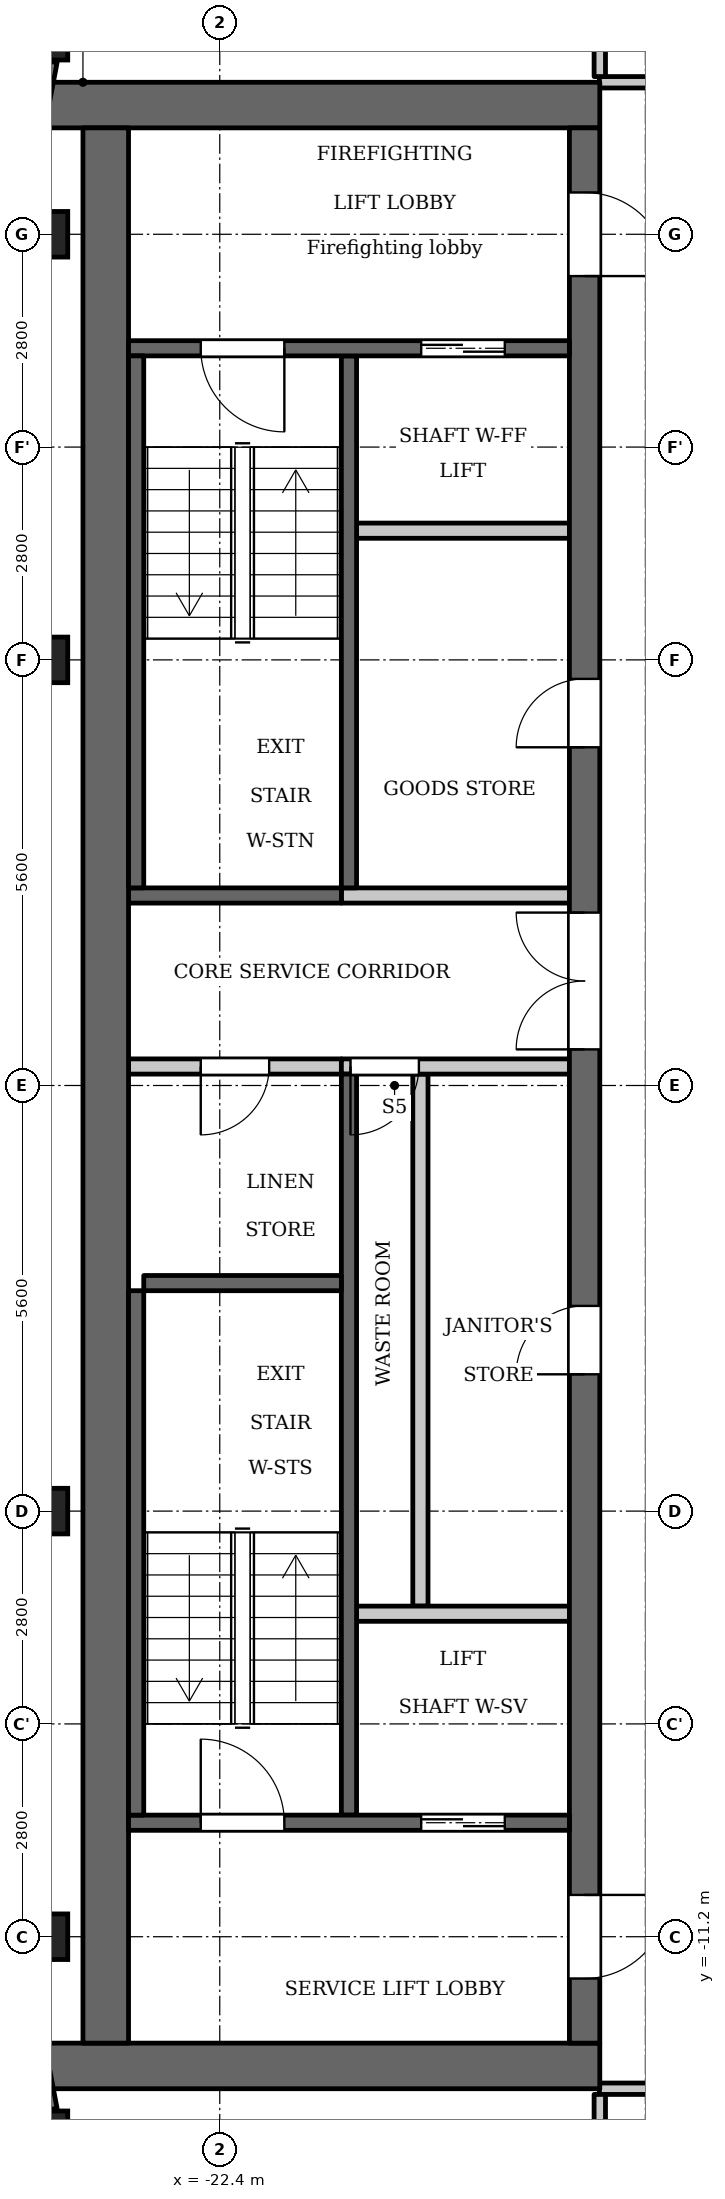
"""IFC4 building model, lengths in metres.
Left out: names, types, materials, properties, quantities, classifications, styles, units other than length and angle.
Written with IfcOpenShell. Run it as: python <this file> out.ifc"""

import sys

from ifc_helpers import new_model, si_unit, direction, frame, frame_2d, origin, origin_2d, place, context, subcontext, project, spatial, rectangle, extrude, element, fill, save


model = new_model("IFC4")
c1 = context("Model", 3, precision=1e-05, world=origin(), true_north=direction((0.0, 1.0)))
c2 = subcontext(c1, "Body", "Model", "MODEL_VIEW")
j1 = project(units=[si_unit("LENGTHUNIT", "METRE"), si_unit("PLANEANGLEUNIT", "RADIAN")], contexts=[c1])
p1 = place(None, origin())
s1 = spatial("IfcSite", under=j1, at=p1, CompositionType="ELEMENT")
p2 = place(p1, origin())
s2 = spatial("IfcBuilding", under=s1, at=p2, CompositionType="ELEMENT")
p3 = place(p2, frame((0.0, 0.0, 303.4)))
s3 = spatial("IfcBuildingStorey", under=s2, at=p3, CompositionType="ELEMENT", Elevation=303.4)
for number, where, z_axis, x_axis in (
    (1, (-24.7, -13.793, 0.0), (0.0, 0.0, 1.0), (1.0, 0.0, 0.0)),
    (2, (-24.7, -11.2, 0.0), (0.0, 0.0, 1.0), (1.0, 0.0, 0.0)),
    (3, (-24.7, -5.6, 0.0), (0.0, 0.0, 1.0), (1.0, 0.0, 0.0)),
    (4, (-24.7, 5.6, 0.0), (0.0, 0.0, 1.0), (1.0, 0.0, 0.0)),
    (5, (-24.7, 11.2, 0.0), (0.0, 0.0, 1.0), (1.0, 0.0, 0.0)),
    (6, (-24.7, 13.793, 0.0), (0.0, 0.0, 1.0), (1.0, 0.0, 0.0)),
):
    element("IfcColumn", number, at=place(p3, frame(where, z_axis=z_axis, x_axis=x_axis)), inside=s3, PredefinedType="COLUMN", context=c2, shape_type="SweptSolid", body=[
        extrude(rectangle(XDim=0.6, YDim=0.6, at=origin_2d()), origin(), (0.0, 0.0, 1.0), 3.5),
    ])
for number, where, z_axis, x_axis in (
    (7, (-24.688, 13.485, 0.0), (0.0, 0.0, 1.0), (-0.187, -0.982, 0.0)),
    (8, (-25.052, -11.573, 0.0), (0.0, 0.0, 1.0), (0.187, -0.982, 0.0)),
):
    element("IfcWall", number, at=place(p3, frame(where, z_axis=z_axis, x_axis=x_axis)), inside=s3, PredefinedType="SOLIDWALL", context=c2, shape_type="SweptSolid", body=[
        extrude(rectangle(XDim=1.947, YDim=0.3, at=frame_2d((0.973, 0.0))), origin(), (0.0, 0.0, 1.0), 2.6),
    ])
p4 = place(p3, frame((-20.7, 2.6, 0.0), z_axis=(0.0, 0.0, 1.0), x_axis=(0.0, 1.0, 0.0)))
e9 = element("IfcWall", 9, at=p4, inside=s3, PredefinedType="SHEAR", context=c2, shape_type="SweptSolid", body=[
    extrude(rectangle(XDim=7.0, YDim=0.2, at=frame_2d((3.5, 0.0))), origin(), (0.0, 0.0, 1.0), 3.2),
])
p5 = place(p3, frame((-20.7, -9.6, 0.0), z_axis=(0.0, 0.0, 1.0), x_axis=(0.0, 1.0, 0.0)))
e10 = element("IfcWall", 10, at=p5, inside=s3, PredefinedType="SHEAR", context=c2, shape_type="SweptSolid", body=[
    extrude(rectangle(XDim=9.75, YDim=0.2, at=frame_2d((4.875, 0.0))), origin(), (0.0, 0.0, 1.0), 3.2),
])
p6 = place(p3, frame((-20.8, 2.5, 0.0), z_axis=(0.0, 0.0, 1.0), x_axis=(-1.0, 0.0, 0.0)))
e11 = element("IfcWall", 11, at=p6, inside=s3, PredefinedType="SHEAR", context=c2, shape_type="SweptSolid", body=[
    extrude(rectangle(XDim=2.8, YDim=0.2, at=frame_2d((1.4, 0.0))), origin(), (0.0, 0.0, 1.0), 3.2),
])
p7 = place(p3, frame((-20.8, 0.25, 0.0), z_axis=(0.0, 0.0, 1.0), x_axis=(-1.0, 0.0, 0.0)))
e12 = element("IfcWall", 12, at=p7, inside=s3, PredefinedType="PARTITIONING", context=c2, shape_type="SweptSolid", body=[
    extrude(rectangle(XDim=2.8, YDim=0.2, at=frame_2d((1.4, 0.0))), origin(), (0.0, 0.0, 1.0), 3.2),
])
p8 = place(p7, frame((0.95, 0.0, 0.0)))
e13 = element("IfcOpeningElement", 13, at=p8, cuts=e12, PredefinedType="OPENING", context=c2, shape_type="SweptSolid", body=[
    extrude(rectangle(XDim=0.9, YDim=2.1, at=frame_2d((0.45, 1.05))), frame((0.0, 0.11, 0.0), z_axis=(0.0, -1.0, 0.0), x_axis=(1.0, 0.0, 0.0)), (0.0, 0.0, 1.0), 0.22),
])
for number, where, z_axis, x_axis in (
    (14, (-17.4, 12.9, 0.0), (0.0, 0.0, 1.0), (-1.0, 0.0, 0.0)),
    (15, (-17.4, -12.9, 0.0), (0.0, 0.0, 1.0), (-1.0, 0.0, 0.0)),
):
    element("IfcWall", number, at=place(p3, frame(where, z_axis=z_axis, x_axis=x_axis)), inside=s3, PredefinedType="SHEAR", context=c2, shape_type="SweptSolid", body=[
        extrude(rectangle(XDim=7.6, YDim=0.6, at=frame_2d((3.8, 0.0))), origin(), (0.0, 0.0, 1.0), 3.2),
    ])
p9 = place(p3, frame((-19.76, -6.85, 0.0), z_axis=(0.0, 0.0, 1.0), x_axis=(0.0, 1.0, 0.0)))
e16 = element("IfcWall", 16, at=p9, inside=s3, PredefinedType="PARTITIONING", context=c2, shape_type="SweptSolid", body=[
    extrude(rectangle(XDim=7.0, YDim=0.2, at=frame_2d((3.5, 0.0))), origin(), (0.0, 0.0, 1.0), 3.2),
])
p10 = place(p3, frame((-17.6, -12.6, 0.0), z_axis=(0.0, 0.0, 1.0), x_axis=(0.0, 1.0, 0.0)))
e17 = element("IfcWall", 17, at=p10, inside=s3, PredefinedType="SHEAR", context=c2, shape_type="SweptSolid", body=[
    extrude(rectangle(XDim=25.2, YDim=0.4, at=frame_2d((12.6, 0.0))), origin(), (0.0, 0.0, 1.0), 3.2),
])
p11 = place(p10, frame((8.8, 0.0, 0.0)))
e18 = element("IfcOpeningElement", 18, at=p11, cuts=e17, PredefinedType="OPENING", context=c2, shape_type="SweptSolid", body=[
    extrude(rectangle(XDim=0.9, YDim=2.1, at=frame_2d((0.45, 1.05))), frame((0.0, 0.21, 0.0), z_axis=(0.0, -1.0, 0.0), x_axis=(1.0, 0.0, 0.0)), (0.0, 0.0, 1.0), 0.42),
])
p12 = place(p10, frame((17.05, 0.0, 0.0)))
e19 = element("IfcOpeningElement", 19, at=p12, cuts=e17, PredefinedType="OPENING", context=c2, shape_type="SweptSolid", body=[
    extrude(rectangle(XDim=0.9, YDim=2.1, at=frame_2d((0.45, 1.05))), frame((0.0, 0.21, 0.0), z_axis=(0.0, -1.0, 0.0), x_axis=(1.0, 0.0, 0.0)), (0.0, 0.0, 1.0), 0.42),
])
p13 = place(p10, frame((23.25, 0.0, 0.0)))
e20 = element("IfcOpeningElement", 20, at=p13, cuts=e17, PredefinedType="OPENING", context=c2, shape_type="SweptSolid", body=[
    extrude(rectangle(XDim=1.1, YDim=2.1, at=frame_2d((0.55, 1.05))), frame((0.0, 0.21, 0.0), z_axis=(0.0, -1.0, 0.0), x_axis=(1.0, 0.0, 0.0)), (0.0, 0.0, 1.0), 0.42),
])
p14 = place(p10, frame((0.85, 0.0, 0.0)))
e21 = element("IfcOpeningElement", 21, at=p14, cuts=e17, PredefinedType="OPENING", context=c2, shape_type="SweptSolid", body=[
    extrude(rectangle(XDim=1.1, YDim=2.1, at=frame_2d((0.55, 1.05))), frame((0.0, 0.21, 0.0), z_axis=(0.0, -1.0, 0.0), x_axis=(1.0, 0.0, 0.0)), (0.0, 0.0, 1.0), 0.42),
])
p15 = place(p10, frame((13.075, 0.0, 0.0)))
e22 = element("IfcOpeningElement", 22, at=p15, cuts=e17, PredefinedType="OPENING", context=c2, shape_type="SweptSolid", body=[
    extrude(rectangle(XDim=1.8, YDim=2.1, at=frame_2d((0.9, 1.05))), frame((0.0, 0.21, 0.0), z_axis=(0.0, -1.0, 0.0), x_axis=(1.0, 0.0, 0.0)), (0.0, 0.0, 1.0), 0.42),
])
p16 = place(p3, frame((-23.9, -12.6, 0.0), z_axis=(0.0, 0.0, 1.0), x_axis=(0.0, 1.0, 0.0)))
e23 = element("IfcWall", 23, at=p16, inside=s3, PredefinedType="SHEAR", context=c2, shape_type="SweptSolid", body=[
    extrude(rectangle(XDim=25.2, YDim=0.6, at=frame_2d((12.6, 0.0))), origin(), (0.0, 0.0, 1.0), 3.2),
])
p17 = place(p3, frame((-17.8, -9.7, 0.0), z_axis=(0.0, 0.0, 1.0), x_axis=(-1.0, 0.0, 0.0)))
e24 = element("IfcWall", 24, at=p17, inside=s3, PredefinedType="SHEAR", context=c2, shape_type="SweptSolid", body=[
    extrude(rectangle(XDim=5.8, YDim=0.2, at=frame_2d((2.9, 0.0))), origin(), (0.0, 0.0, 1.0), 3.2),
])
p18 = place(p17, frame((0.85, 0.0, 0.0)))
e25 = element("IfcOpeningElement", 25, at=p18, cuts=e24, PredefinedType="OPENING", context=c2, shape_type="SweptSolid", body=[
    extrude(rectangle(XDim=1.1, YDim=2.1, at=frame_2d((0.55, 1.05))), frame((0.0, 0.11, 0.0), z_axis=(0.0, -1.0, 0.0), x_axis=(1.0, 0.0, 0.0)), (0.0, 0.0, 1.0), 0.22),
])
p19 = place(p17, frame((3.75, 0.0, 0.0)))
e26 = element("IfcOpeningElement", 26, at=p19, cuts=e24, PredefinedType="OPENING", context=c2, shape_type="SweptSolid", body=[
    extrude(rectangle(XDim=1.1, YDim=2.1, at=frame_2d((0.55, 1.05))), frame((0.0, 0.11, 0.0), z_axis=(0.0, -1.0, 0.0), x_axis=(1.0, 0.0, 0.0)), (0.0, 0.0, 1.0), 0.22),
])
p20 = place(p3, frame((-17.8, -6.95, 0.0), z_axis=(0.0, 0.0, 1.0), x_axis=(-1.0, 0.0, 0.0)))
e27 = element("IfcWall", 27, at=p20, inside=s3, PredefinedType="PARTITIONING", context=c2, shape_type="SweptSolid", body=[
    extrude(rectangle(XDim=2.8, YDim=0.2, at=frame_2d((1.4, 0.0))), origin(), (0.0, 0.0, 1.0), 3.2),
])
p21 = place(p3, frame((-17.8, 0.25, 0.0), z_axis=(0.0, 0.0, 1.0), x_axis=(-1.0, 0.0, 0.0)))
e28 = element("IfcWall", 28, at=p21, inside=s3, PredefinedType="PARTITIONING", context=c2, shape_type="SweptSolid", body=[
    extrude(rectangle(XDim=3.0, YDim=0.2, at=frame_2d((1.5, 0.0))), origin(), (0.0, 0.0, 1.0), 3.2),
])
p22 = place(p21, frame((1.98, 0.0, 0.0)))
e29 = element("IfcOpeningElement", 29, at=p22, cuts=e28, PredefinedType="OPENING", context=c2, shape_type="SweptSolid", body=[
    extrude(rectangle(XDim=0.9, YDim=2.1, at=frame_2d((0.45, 1.05))), frame((0.0, 0.11, 0.0), z_axis=(0.0, -1.0, 0.0), x_axis=(1.0, 0.0, 0.0)), (0.0, 0.0, 1.0), 0.22),
])
p23 = place(p3, frame((-17.8, 2.5, 0.0), z_axis=(0.0, 0.0, 1.0), x_axis=(-1.0, 0.0, 0.0)))
e30 = element("IfcWall", 30, at=p23, inside=s3, PredefinedType="PARTITIONING", context=c2, shape_type="SweptSolid", body=[
    extrude(rectangle(XDim=3.0, YDim=0.2, at=frame_2d((1.5, 0.0))), origin(), (0.0, 0.0, 1.0), 3.2),
])
p24 = place(p3, frame((-17.8, 7.3, 0.0), z_axis=(0.0, 0.0, 1.0), x_axis=(-1.0, 0.0, 0.0)))
e31 = element("IfcWall", 31, at=p24, inside=s3, PredefinedType="PARTITIONING", context=c2, shape_type="SweptSolid", body=[
    extrude(rectangle(XDim=2.8, YDim=0.2, at=frame_2d((1.4, 0.0))), origin(), (0.0, 0.0, 1.0), 3.2),
])
p25 = place(p3, frame((-17.8, 9.7, 0.0), z_axis=(0.0, 0.0, 1.0), x_axis=(-1.0, 0.0, 0.0)))
e32 = element("IfcWall", 32, at=p25, inside=s3, PredefinedType="SHEAR", context=c2, shape_type="SweptSolid", body=[
    extrude(rectangle(XDim=5.8, YDim=0.2, at=frame_2d((2.9, 0.0))), origin(), (0.0, 0.0, 1.0), 3.2),
])
p26 = place(p25, frame((0.85, 0.0, 0.0)))
e33 = element("IfcOpeningElement", 33, at=p26, cuts=e32, PredefinedType="OPENING", context=c2, shape_type="SweptSolid", body=[
    extrude(rectangle(XDim=1.1, YDim=2.1, at=frame_2d((0.55, 1.05))), frame((0.0, 0.11, 0.0), z_axis=(0.0, -1.0, 0.0), x_axis=(1.0, 0.0, 0.0)), (0.0, 0.0, 1.0), 0.22),
])
p27 = place(p25, frame((3.75, 0.0, 0.0)))
e34 = element("IfcOpeningElement", 34, at=p27, cuts=e32, PredefinedType="OPENING", context=c2, shape_type="SweptSolid", body=[
    extrude(rectangle(XDim=1.1, YDim=2.1, at=frame_2d((0.55, 1.05))), frame((0.0, 0.11, 0.0), z_axis=(0.0, -1.0, 0.0), x_axis=(1.0, 0.0, 0.0)), (0.0, 0.0, 1.0), 0.22),
])
p28 = place(p3, frame((-23.5, 2.6, 0.0), z_axis=(0.0, 0.0, 1.0), x_axis=(0.0, 1.0, 0.0)))
e35 = element("IfcWall", 35, at=p28, inside=s3, PredefinedType="SHEAR", context=c2, shape_type="SweptSolid", body=[
    extrude(rectangle(XDim=7.0, YDim=0.2, at=frame_2d((3.5, 0.0))), origin(), (0.0, 0.0, 1.0), 3.2),
])
p29 = place(p3, frame((-23.5, -9.6, 0.0), z_axis=(0.0, 0.0, 1.0), x_axis=(0.0, 1.0, 0.0)))
e36 = element("IfcWall", 36, at=p29, inside=s3, PredefinedType="SHEAR", context=c2, shape_type="SweptSolid", body=[
    extrude(rectangle(XDim=6.9, YDim=0.2, at=frame_2d((3.45, 0.0))), origin(), (0.0, 0.0, 1.0), 3.2),
])
p30 = place(p3, frame((-20.8, -2.6, 0.0), z_axis=(0.0, 0.0, 1.0), x_axis=(-1.0, 0.0, 0.0)))
e37 = element("IfcWall", 37, at=p30, inside=s3, PredefinedType="SHEAR", context=c2, shape_type="SweptSolid", body=[
    extrude(rectangle(XDim=2.6, YDim=0.2, at=frame_2d((1.3, 0.0))), origin(), (0.0, 0.0, 1.0), 3.2),
])
p31 = place(p3, frame((-17.405, -13.2, 0.0), z_axis=(0.0, 0.0, 1.0), x_axis=(1.0, 0.0, 0.0)))
e38 = element("IfcWall", 38, at=p31, inside=s3, PredefinedType="PARTITIONING", context=c2, shape_type="SweptSolid", body=[
    extrude(rectangle(XDim=2.085, YDim=0.15, at=frame_2d((1.042, 0.0))), origin(), (0.0, 0.0, 1.0), 3.2),
])
p32 = place(p31, frame((0.655, 0.0, 0.0)))
e39 = element("IfcOpeningElement", 39, at=p32, cuts=e38, PredefinedType="OPENING", context=c2, shape_type="SweptSolid", body=[
    extrude(rectangle(XDim=1.0, YDim=2.1, at=frame_2d((0.5, 1.05))), frame((0.0, 0.085, 0.0), z_axis=(0.0, -1.0, 0.0), x_axis=(1.0, 0.0, 0.0)), (0.0, 0.0, 1.0), 0.17),
])
p33 = place(p3, frame((-17.405, 13.2, 0.0), z_axis=(0.0, 0.0, 1.0), x_axis=(1.0, 0.0, 0.0)))
e40 = element("IfcWall", 40, at=p33, inside=s3, PredefinedType="PARTITIONING", context=c2, shape_type="SweptSolid", body=[
    extrude(rectangle(XDim=2.085, YDim=0.15, at=frame_2d((1.042, 0.0))), origin(), (0.0, 0.0, 1.0), 3.2),
])
p34 = place(p33, frame((0.665, 0.0, 0.0)))
e41 = element("IfcOpeningElement", 41, at=p34, cuts=e40, PredefinedType="OPENING", context=c2, shape_type="SweptSolid", body=[
    extrude(rectangle(XDim=1.0, YDim=2.1, at=frame_2d((0.5, 1.05))), frame((0.0, 0.085, 0.0), z_axis=(0.0, -1.0, 0.0), x_axis=(1.0, 0.0, 0.0)), (0.0, 0.0, 1.0), 0.17),
])
p35 = place(p3, frame((-17.4, -19.236, 0.0), z_axis=(0.0, 0.0, 1.0), x_axis=(0.0, 1.0, 0.0)))
e42 = element("IfcWall", 42, at=p35, inside=s3, PredefinedType="PARTITIONING", context=c2, shape_type="SweptSolid", body=[
    extrude(rectangle(XDim=5.961, YDim=0.15, at=frame_2d((2.981, 0.0))), origin(), (0.0, 0.0, 1.0), 3.2),
])
p36 = place(p35, frame((0.386, 0.0, 0.0)))
e43 = element("IfcOpeningElement", 43, at=p36, cuts=e42, PredefinedType="OPENING", context=c2, shape_type="SweptSolid", body=[
    extrude(rectangle(XDim=1.0, YDim=2.1, at=frame_2d((0.5, 1.05))), frame((0.0, 0.085, 0.0), z_axis=(0.0, -1.0, 0.0), x_axis=(1.0, 0.0, 0.0)), (0.0, 0.0, 1.0), 0.17),
])
p37 = place(p3, frame((-17.4, 13.275, 0.0), z_axis=(0.0, 0.0, 1.0), x_axis=(0.0, 1.0, 0.0)))
e44 = element("IfcWall", 44, at=p37, inside=s3, PredefinedType="PARTITIONING", context=c2, shape_type="SweptSolid", body=[
    extrude(rectangle(XDim=5.961, YDim=0.15, at=frame_2d((2.981, 0.0))), origin(), (0.0, 0.0, 1.0), 3.2),
])
p38 = place(p37, frame((1.045, 0.0, 0.0)))
e45 = element("IfcOpeningElement", 45, at=p38, cuts=e44, PredefinedType="OPENING", context=c2, shape_type="SweptSolid", body=[
    extrude(rectangle(XDim=1.0, YDim=2.1, at=frame_2d((0.5, 1.05))), frame((0.0, 0.085, 0.0), z_axis=(0.0, -1.0, 0.0), x_axis=(1.0, 0.0, 0.0)), (0.0, 0.0, 1.0), 0.17),
])
p39 = place(p18, origin())
e46 = element("IfcDoor", 46, at=p39, inside=s3, OperationType="DOUBLE_DOOR_SLIDING", PredefinedType="DOOR", context=c2, shape_type="SweptSolid", body=[
    extrude(rectangle(XDim=1.1, YDim=2.1, at=frame_2d((0.55, 1.05))), frame((0.0, 0.025, 0.0), z_axis=(0.0, -1.0, 0.0), x_axis=(1.0, 0.0, 0.0)), (0.0, 0.0, 1.0), 0.05),
])
fill(e25, e46)
p40 = place(p11, origin())
e47 = element("IfcDoor", 47, at=p40, inside=s3, OperationType="SINGLE_SWING_RIGHT", PredefinedType="DOOR", context=c2, shape_type="SweptSolid", body=[
    extrude(rectangle(XDim=0.9, YDim=2.1, at=frame_2d((0.45, 1.05))), frame((0.0, 0.025, 0.0), z_axis=(0.0, -1.0, 0.0), x_axis=(1.0, 0.0, 0.0)), (0.0, 0.0, 1.0), 0.05),
])
fill(e18, e47)
p41 = place(p22, origin())
e48 = element("IfcDoor", 48, at=p41, inside=s3, OperationType="SINGLE_SWING_LEFT", PredefinedType="DOOR", context=c2, shape_type="SweptSolid", body=[
    extrude(rectangle(XDim=0.9, YDim=2.1, at=frame_2d((0.45, 1.05))), frame((0.0, 0.025, 0.0), z_axis=(0.0, -1.0, 0.0), x_axis=(1.0, 0.0, 0.0)), (0.0, 0.0, 1.0), 0.05),
])
fill(e29, e48)
p42 = place(p12, origin())
e49 = element("IfcDoor", 49, at=p42, inside=s3, OperationType="SINGLE_SWING_RIGHT", PredefinedType="DOOR", context=c2, shape_type="SweptSolid", body=[
    extrude(rectangle(XDim=0.9, YDim=2.1, at=frame_2d((0.45, 1.05))), frame((0.0, 0.025, 0.0), z_axis=(0.0, -1.0, 0.0), x_axis=(1.0, 0.0, 0.0)), (0.0, 0.0, 1.0), 0.05),
])
fill(e19, e49)
p43 = place(p26, origin())
e50 = element("IfcDoor", 50, at=p43, inside=s3, OperationType="DOUBLE_DOOR_SLIDING", PredefinedType="DOOR", context=c2, shape_type="SweptSolid", body=[
    extrude(rectangle(XDim=1.1, YDim=2.1, at=frame_2d((0.55, 1.05))), frame((0.0, 0.025, 0.0), z_axis=(0.0, -1.0, 0.0), x_axis=(1.0, 0.0, 0.0)), (0.0, 0.0, 1.0), 0.05),
])
fill(e33, e50)
p44 = place(p13, origin())
e51 = element("IfcDoor", 51, at=p44, inside=s3, OperationType="SINGLE_SWING_LEFT", PredefinedType="DOOR", context=c2, shape_type="SweptSolid", body=[
    extrude(rectangle(XDim=1.1, YDim=2.1, at=frame_2d((0.55, 1.05))), frame((0.0, 0.025, 0.0), z_axis=(0.0, -1.0, 0.0), x_axis=(1.0, 0.0, 0.0)), (0.0, 0.0, 1.0), 0.05),
])
fill(e20, e51)
p45 = place(p14, origin())
e52 = element("IfcDoor", 52, at=p45, inside=s3, OperationType="SINGLE_SWING_RIGHT", PredefinedType="DOOR", context=c2, shape_type="SweptSolid", body=[
    extrude(rectangle(XDim=1.1, YDim=2.1, at=frame_2d((0.55, 1.05))), frame((0.0, 0.025, 0.0), z_axis=(0.0, -1.0, 0.0), x_axis=(1.0, 0.0, 0.0)), (0.0, 0.0, 1.0), 0.05),
])
fill(e21, e52)
p46 = place(p27, origin())
e53 = element("IfcDoor", 53, at=p46, inside=s3, OperationType="SINGLE_SWING_RIGHT", PredefinedType="DOOR", context=c2, shape_type="SweptSolid", body=[
    extrude(rectangle(XDim=1.1, YDim=2.1, at=frame_2d((0.55, 1.05))), frame((0.0, 0.025, 0.0), z_axis=(0.0, -1.0, 0.0), x_axis=(1.0, 0.0, 0.0)), (0.0, 0.0, 1.0), 0.05),
])
fill(e34, e53)
p47 = place(p19, origin())
e54 = element("IfcDoor", 54, at=p47, inside=s3, OperationType="SINGLE_SWING_RIGHT", PredefinedType="DOOR", context=c2, shape_type="SweptSolid", body=[
    extrude(rectangle(XDim=1.1, YDim=2.1, at=frame_2d((0.55, 1.05))), frame((0.0, 0.025, 0.0), z_axis=(0.0, -1.0, 0.0), x_axis=(1.0, 0.0, 0.0)), (0.0, 0.0, 1.0), 0.05),
])
fill(e26, e54)
p48 = place(p15, origin())
e55 = element("IfcDoor", 55, at=p48, inside=s3, OperationType="DOUBLE_DOOR_SINGLE_SWING", PredefinedType="DOOR", context=c2, shape_type="SweptSolid", body=[
    extrude(rectangle(XDim=1.8, YDim=2.1, at=frame_2d((0.9, 1.05))), frame((0.0, 0.025, 0.0), z_axis=(0.0, -1.0, 0.0), x_axis=(1.0, 0.0, 0.0)), (0.0, 0.0, 1.0), 0.05),
])
fill(e22, e55)
p49 = place(p8, origin())
e56 = element("IfcDoor", 56, at=p49, inside=s3, OperationType="SINGLE_SWING_LEFT", PredefinedType="DOOR", context=c2, shape_type="SweptSolid", body=[
    extrude(rectangle(XDim=0.9, YDim=2.1, at=frame_2d((0.45, 1.05))), frame((0.0, 0.025, 0.0), z_axis=(0.0, -1.0, 0.0), x_axis=(1.0, 0.0, 0.0)), (0.0, 0.0, 1.0), 0.05),
])
fill(e13, e56)
save(model, sys.argv[1])
